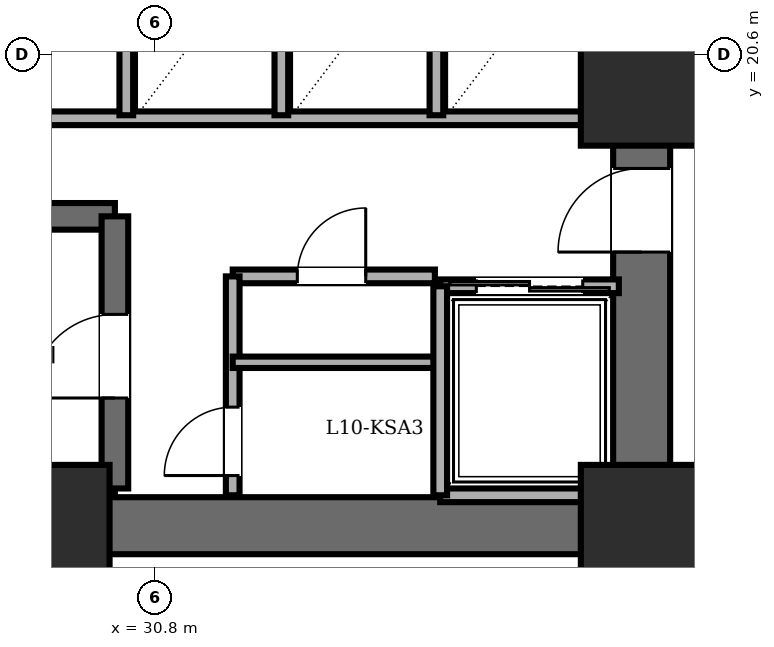
"""IFC4 building model, lengths in metres.
Left out: names, types, materials, properties, quantities, classifications, styles, units other than length and angle.
Written with IfcOpenShell. Run it as: python <this file> out.ifc"""

import sys

from ifc_helpers import new_model, si_unit, direction, frame, frame_2d, origin, origin_2d, place, context, subcontext, project, spatial, rectangle, extrude, element, fill, save


model = new_model("IFC4")
c1 = context("Model", 3, precision=1e-05, world=origin(), true_north=direction((0.0, 1.0)))
c2 = subcontext(c1, "Body", "Model", "MODEL_VIEW")
j1 = project(units=[si_unit("LENGTHUNIT", "METRE"), si_unit("PLANEANGLEUNIT", "RADIAN")], contexts=[c1])
p1 = place(None, origin())
s1 = spatial("IfcSite", under=j1, at=p1, CompositionType="ELEMENT")
p2 = place(p1, origin())
s2 = spatial("IfcBuilding", under=s1, at=p2, CompositionType="ELEMENT")
p3 = place(p2, frame((0.0, 0.0, 39.6)))
s3 = spatial("IfcBuildingStorey", under=s2, at=p3, CompositionType="ELEMENT", Elevation=39.6)
for number, where, z_axis, x_axis in (
    (1, (29.4, 14.4, 0.0), (0.0, 0.0, 1.0), (1.0, 0.0, 0.0)),
    (2, (37.2, 14.4, 0.0), (0.0, 0.0, 1.0), (1.0, 0.0, 0.0)),
    (3, (37.2, 20.2, 0.0), (0.0, 0.0, 1.0), (1.0, 0.0, 0.0)),
):
    element("IfcColumn", number, at=place(p3, frame(where, z_axis=z_axis, x_axis=x_axis)), inside=s3, PredefinedType="COLUMN", context=c2, shape_type="SweptSolid", body=[
        extrude(rectangle(XDim=1.6, YDim=1.6, at=origin_2d()), origin(), (0.0, 0.0, 1.0), 3.6),
    ])
p4 = place(p3, frame((37.2, 14.4, 0.0), z_axis=(0.0, 0.0, 1.0), x_axis=(-1.0, 0.0, 0.0)))
e4 = element("IfcWall", 4, at=p4, inside=s3, PredefinedType="SHEAR", context=c2, shape_type="SweptSolid", body=[
    extrude(rectangle(XDim=15.6, YDim=0.75, at=frame_2d((7.8, 0.0))), origin(), (0.0, 0.0, 1.0), 3.4),
])
p5 = place(p3, frame((37.2, 14.4, 0.0), z_axis=(0.0, 0.0, 1.0), x_axis=(0.0, 1.0, 0.0)))
e5 = element("IfcWall", 5, at=p5, inside=s3, PredefinedType="SHEAR", context=c2, shape_type="SweptSolid", body=[
    extrude(rectangle(XDim=19.2, YDim=0.75, at=frame_2d((9.6, 0.0))), origin(), (0.0, 0.0, 1.0), 3.4),
])
p6 = place(p5, frame((15.8, 0.0, 0.0)))
e6 = element("IfcOpeningElement", 6, at=p6, cuts=e5, PredefinedType="OPENING", context=c2, shape_type="SweptSolid", body=[
    extrude(rectangle(XDim=1.15, YDim=2.15, at=frame_2d((0.575, 1.075))), frame((0.0, 0.385, 0.0), z_axis=(0.0, -1.0, 0.0), x_axis=(1.0, 0.0, 0.0)), (0.0, 0.0, 1.0), 0.77),
])
p7 = place(p5, frame((3.6, 0.0, 0.0)))
e7 = element("IfcOpeningElement", 7, at=p7, cuts=e5, PredefinedType="OPENING", context=c2, shape_type="SweptSolid", body=[
    extrude(rectangle(XDim=1.1, YDim=2.15, at=frame_2d((0.55, 1.075))), frame((0.0, 0.385, 0.0), z_axis=(0.0, -1.0, 0.0), x_axis=(1.0, 0.0, 0.0)), (0.0, 0.0, 1.0), 0.77),
])
p8 = place(p5, frame((8.6, 0.0, 0.0)))
e8 = element("IfcOpeningElement", 8, at=p8, cuts=e5, PredefinedType="OPENING", context=c2, shape_type="SweptSolid", body=[
    extrude(rectangle(XDim=1.3, YDim=2.2, at=frame_2d((0.65, 1.1))), frame((0.0, 0.385, 0.0), z_axis=(0.0, -1.0, 0.0), x_axis=(1.0, 0.0, 0.0)), (0.0, 0.0, 1.0), 0.77),
])
p9 = place(p3, frame((22.48, 18.47, 0.0), z_axis=(0.0, 0.0, 1.0), x_axis=(1.0, 0.0, 0.0)))
e9 = element("IfcWall", 9, at=p9, inside=s3, PredefinedType="SOLIDWALL", context=c2, shape_type="SweptSolid", body=[
    extrude(rectangle(XDim=7.79, YDim=0.35, at=frame_2d((3.895, 0.0))), origin(), (0.0, 0.0, 1.0), 3.4),
])
p10 = place(p3, frame((22.48, 14.89, 0.0), z_axis=(0.0, 0.0, 1.0), x_axis=(1.0, 0.0, 0.0)))
e10 = element("IfcWall", 10, at=p10, inside=s3, PredefinedType="PARTITIONING", context=c2, shape_type="SweptSolid", body=[
    extrude(rectangle(XDim=7.79, YDim=0.22, at=frame_2d((3.895, 0.0))), origin(), (0.0, 0.0, 1.0), 3.4),
])
p11 = place(p3, frame((30.27, 14.89, 0.0), z_axis=(0.0, 0.0, 1.0), x_axis=(0.0, 1.0, 0.0)))
e11 = element("IfcWall", 11, at=p11, inside=s3, PredefinedType="SOLIDWALL", context=c2, shape_type="SweptSolid", body=[
    extrude(rectangle(XDim=3.58, YDim=0.35, at=frame_2d((1.79, 0.0))), origin(), (0.0, 0.0, 1.0), 3.4),
])
p12 = place(p11, frame((1.19, 0.0, 0.0)))
e12 = element("IfcOpeningElement", 12, at=p12, cuts=e11, PredefinedType="OPENING", context=c2, shape_type="SweptSolid", body=[
    extrude(rectangle(XDim=1.1, YDim=2.15, at=frame_2d((0.55, 1.075))), frame((0.0, 0.185, 0.0), z_axis=(0.0, -1.0, 0.0), x_axis=(1.0, 0.0, 0.0)), (0.0, 0.0, 1.0), 0.37),
])
p13 = place(p3, frame((21.95, 19.76, 0.0), z_axis=(0.0, 0.0, 1.0), x_axis=(1.0, 0.0, 0.0)))
e13 = element("IfcWall", 13, at=p13, inside=s3, PredefinedType="PARTITIONING", context=c2, shape_type="SweptSolid", body=[
    extrude(rectangle(XDim=14.87, YDim=0.18, at=frame_2d((7.435, 0.0))), origin(), (0.0, 0.0, 1.0), 3.4),
])
p14 = place(p3, frame((31.82, 17.68, 0.0), z_axis=(0.0, 0.0, 1.0), x_axis=(1.0, 0.0, 0.0)))
e14 = element("IfcWall", 14, at=p14, inside=s3, PredefinedType="PARTITIONING", context=c2, shape_type="SweptSolid", body=[
    extrude(rectangle(XDim=2.66, YDim=0.18, at=frame_2d((1.33, 0.0))), origin(), (0.0, 0.0, 1.0), 3.4),
])
p15 = place(p14, frame((0.85, 0.0, 0.0)))
e15 = element("IfcOpeningElement", 15, at=p15, cuts=e14, PredefinedType="OPENING", context=c2, shape_type="SweptSolid", body=[
    extrude(rectangle(XDim=0.9, YDim=2.05, at=frame_2d((0.45, 1.025))), frame((0.0, 0.1, 0.0), z_axis=(0.0, -1.0, 0.0), x_axis=(1.0, 0.0, 0.0)), (0.0, 0.0, 1.0), 0.2),
])
p16 = place(p3, frame((31.82, 14.8, 0.0), z_axis=(0.0, 0.0, 1.0), x_axis=(0.0, 1.0, 0.0)))
e16 = element("IfcWall", 16, at=p16, inside=s3, PredefinedType="PARTITIONING", context=c2, shape_type="SweptSolid", body=[
    extrude(rectangle(XDim=2.88, YDim=0.18, at=frame_2d((1.44, 0.0))), origin(), (0.0, 0.0, 1.0), 3.4),
])
p17 = place(p16, frame((0.26, 0.0, 0.0)))
e17 = element("IfcOpeningElement", 17, at=p17, cuts=e16, PredefinedType="OPENING", context=c2, shape_type="SweptSolid", body=[
    extrude(rectangle(XDim=0.9, YDim=2.05, at=frame_2d((0.45, 1.025))), frame((0.0, 0.1, 0.0), z_axis=(0.0, -1.0, 0.0), x_axis=(1.0, 0.0, 0.0)), (0.0, 0.0, 1.0), 0.2),
])
p18 = place(p3, frame((31.82, 16.55, 0.0), z_axis=(0.0, 0.0, 1.0), x_axis=(1.0, 0.0, 0.0)))
e18 = element("IfcWall", 18, at=p18, inside=s3, PredefinedType="PARTITIONING", context=c2, shape_type="SweptSolid", body=[
    extrude(rectangle(XDim=2.66, YDim=0.15, at=frame_2d((1.33, 0.0))), origin(), (0.0, 0.0, 1.0), 3.4),
])
p19 = place(p3, frame((34.55, 17.55, 0.0), z_axis=(0.0, 0.0, 1.0), x_axis=(1.0, 0.0, 0.0)))
e19 = element("IfcWall", 19, at=p19, inside=s3, PredefinedType="PARTITIONING", context=c2, shape_type="SweptSolid", body=[
    extrude(rectangle(XDim=2.35, YDim=0.18, at=frame_2d((1.175, 0.0))), origin(), (0.0, 0.0, 1.0), 3.4),
])
p20 = place(p19, frame((0.475, 0.0, 0.0)))
e20 = element("IfcOpeningElement", 20, at=p20, cuts=e19, PredefinedType="OPENING", context=c2, shape_type="SweptSolid", body=[
    extrude(rectangle(XDim=1.4, YDim=2.3, at=frame_2d((0.7, 1.15))), frame((0.0, 0.1, 0.0), z_axis=(0.0, -1.0, 0.0), x_axis=(1.0, 0.0, 0.0)), (0.0, 0.0, 1.0), 0.2),
])
p21 = place(p3, frame((36.9, 14.8, 0.0), z_axis=(0.0, 0.0, 1.0), x_axis=(-1.0, 0.0, 0.0)))
e21 = element("IfcWall", 21, at=p21, inside=s3, PredefinedType="PARTITIONING", context=c2, shape_type="SweptSolid", body=[
    extrude(rectangle(XDim=2.35, YDim=0.18, at=frame_2d((1.175, 0.0))), origin(), (0.0, 0.0, 1.0), 3.4),
])
p22 = place(p3, frame((34.55, 17.55, 0.0), z_axis=(0.0, 0.0, 1.0), x_axis=(0.0, -1.0, 0.0)))
e22 = element("IfcWall", 22, at=p22, inside=s3, PredefinedType="PARTITIONING", context=c2, shape_type="SweptSolid", body=[
    extrude(rectangle(XDim=2.75, YDim=0.18, at=frame_2d((1.375, 0.0))), origin(), (0.0, 0.0, 1.0), 3.4),
])
for number, where, z_axis, x_axis in (
    (23, (30.42, 19.8, 0.0), (0.0, 0.0, 1.0), (0.0, 1.0, 0.0)),
    (24, (32.46, 19.8, 0.0), (0.0, 0.0, 1.0), (0.0, 1.0, 0.0)),
    (25, (34.5, 19.8, 0.0), (0.0, 0.0, 1.0), (0.0, 1.0, 0.0)),
    (26, (36.54, 19.8, 0.0), (0.0, 0.0, 1.0), (0.0, 1.0, 0.0)),
):
    element("IfcWall", number, at=place(p3, frame(where, z_axis=z_axis, x_axis=x_axis)), inside=s3, PredefinedType="PARTITIONING", context=c2, shape_type="SweptSolid", body=[
        extrude(rectangle(XDim=2.5, YDim=0.18, at=frame_2d((1.25, 0.0))), origin(), (0.0, 0.0, 1.0), 3.4),
    ])
p23 = place(p12, origin())
e27 = element("IfcDoor", 27, at=p23, inside=s3, OperationType="SINGLE_SWING_LEFT", PredefinedType="DOOR", context=c2, shape_type="SweptSolid", body=[
    extrude(rectangle(XDim=1.1, YDim=2.15, at=frame_2d((0.55, 1.075))), frame((0.0, 0.025, 0.0), z_axis=(0.0, -1.0, 0.0), x_axis=(1.0, 0.0, 0.0)), (0.0, 0.0, 1.0), 0.05),
])
fill(e12, e27)
p24 = place(p7, origin())
e28 = element("IfcDoor", 28, at=p24, inside=s3, OperationType="SINGLE_SWING_LEFT", PredefinedType="DOOR", context=c2, shape_type="SweptSolid", body=[
    extrude(rectangle(XDim=1.1, YDim=2.15, at=frame_2d((0.55, 1.075))), frame((0.0, 0.025, 0.0), z_axis=(0.0, -1.0, 0.0), x_axis=(1.0, 0.0, 0.0)), (0.0, 0.0, 1.0), 0.05),
])
fill(e7, e28)
p25 = place(p15, origin())
e29 = element("IfcDoor", 29, at=p25, inside=s3, OperationType="SINGLE_SWING_RIGHT", PredefinedType="DOOR", context=c2, shape_type="SweptSolid", body=[
    extrude(rectangle(XDim=0.9, YDim=2.05, at=frame_2d((0.45, 1.025))), frame((0.0, 0.025, 0.0), z_axis=(0.0, -1.0, 0.0), x_axis=(1.0, 0.0, 0.0)), (0.0, 0.0, 1.0), 0.05),
])
fill(e15, e29)
p26 = place(p17, origin())
e30 = element("IfcDoor", 30, at=p26, inside=s3, OperationType="SINGLE_SWING_LEFT", PredefinedType="DOOR", context=c2, shape_type="SweptSolid", body=[
    extrude(rectangle(XDim=0.9, YDim=2.05, at=frame_2d((0.45, 1.025))), frame((0.0, 0.025, 0.0), z_axis=(0.0, -1.0, 0.0), x_axis=(1.0, 0.0, 0.0)), (0.0, 0.0, 1.0), 0.05),
])
fill(e17, e30)
p27 = place(p20, origin())
e31 = element("IfcDoor", 31, at=p27, inside=s3, OperationType="DOUBLE_DOOR_SLIDING", PredefinedType="DOOR", context=c2, shape_type="SweptSolid", body=[
    extrude(rectangle(XDim=1.4, YDim=2.3, at=frame_2d((0.7, 1.15))), frame((0.0, 0.025, 0.0), z_axis=(0.0, -1.0, 0.0), x_axis=(1.0, 0.0, 0.0)), (0.0, 0.0, 1.0), 0.05),
])
fill(e20, e31)
save(model, sys.argv[1])
